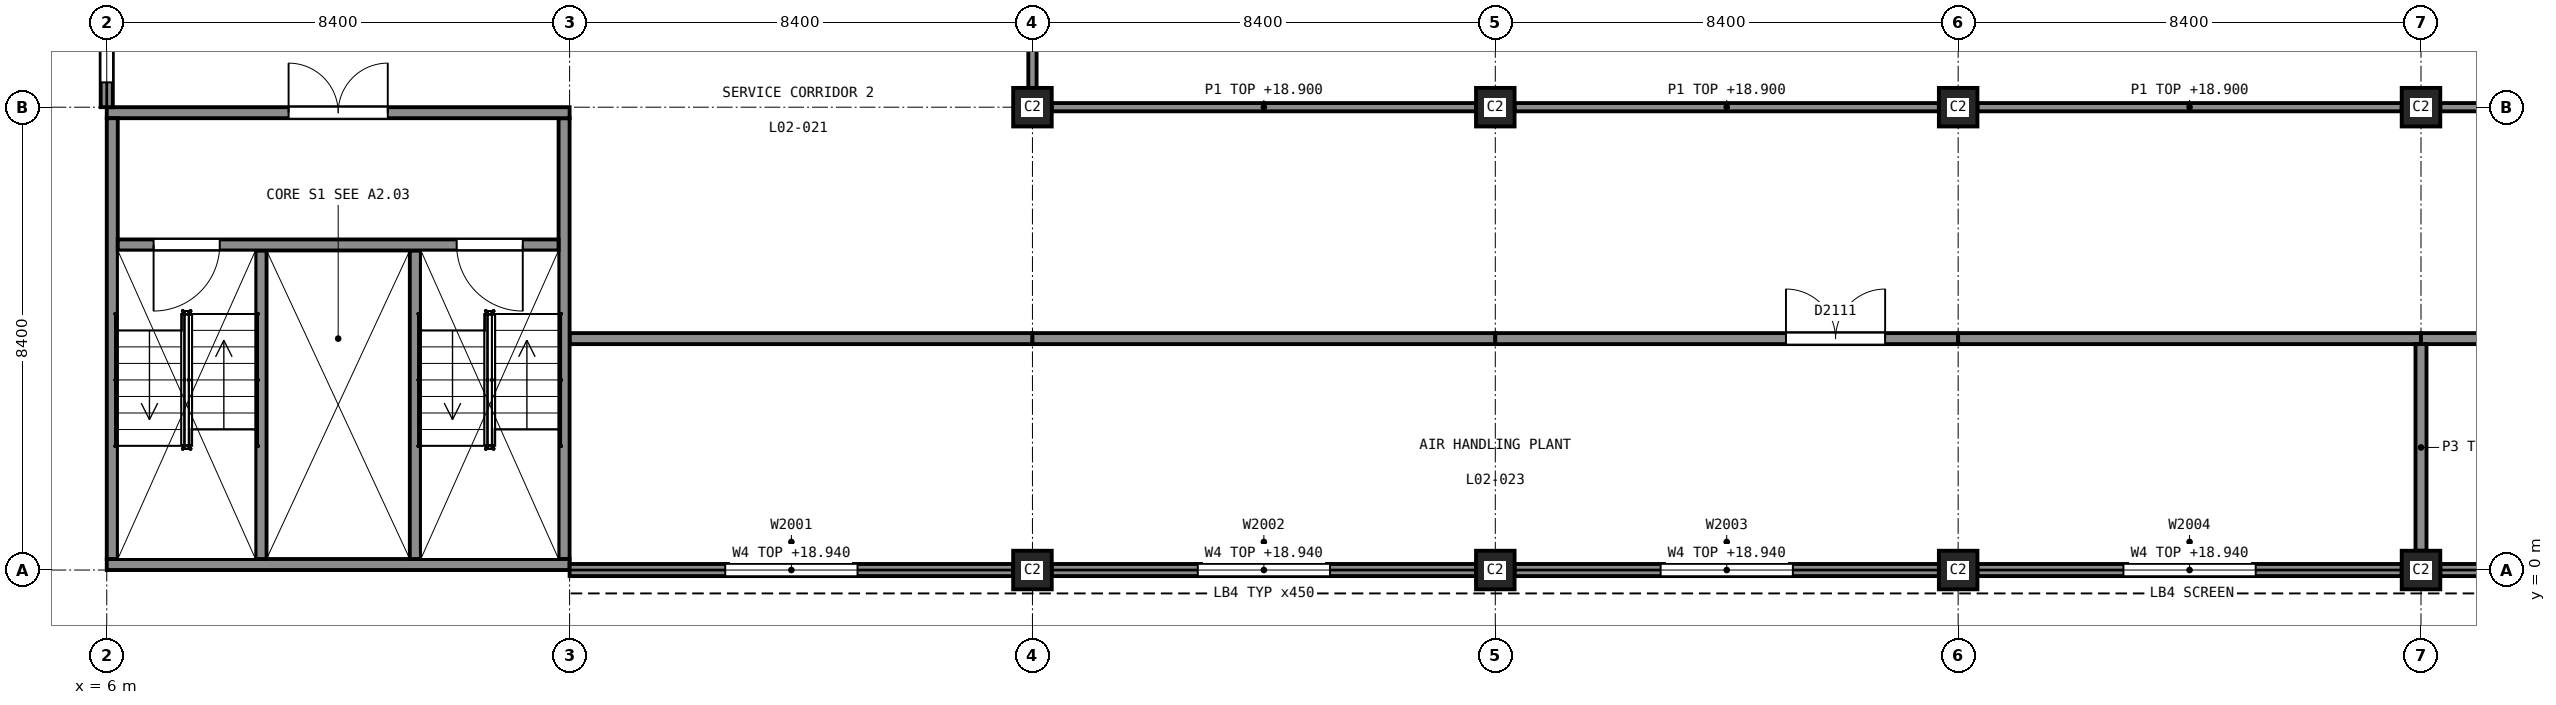
"""IFC4 building model, lengths in metres.
Left out: names, types, materials, properties, quantities, classifications, styles, units other than length and angle.
Written with IfcOpenShell. Run it as: python <this file> out.ifc"""

import sys

from ifc_helpers import new_model, si_unit, direction, frame, frame_2d, origin, origin_2d, place, context, subcontext, project, spatial, rectangle, extrude, element, fill, save


model = new_model("IFC4")
c1 = context("Model", 3, precision=1e-05, world=origin(), true_north=direction((0.0, 1.0)))
c2 = subcontext(c1, "Body", "Model", "MODEL_VIEW")
j1 = project(units=[si_unit("LENGTHUNIT", "METRE"), si_unit("PLANEANGLEUNIT", "RADIAN")], contexts=[c1])
p1 = place(None, origin())
s1 = spatial("IfcSite", under=j1, at=p1, CompositionType="ELEMENT")
p2 = place(p1, origin())
s2 = spatial("IfcBuilding", under=s1, at=p2, CompositionType="ELEMENT")
p3 = place(p2, frame((0.0, 0.0, 10.5)))
s3 = spatial("IfcBuildingStorey", under=s2, at=p3, CompositionType="ELEMENT", Elevation=10.5)
p4 = place(p3, frame((6.0, 0.1, 0.0), z_axis=(0.0, 0.0, 1.0), x_axis=(1.0, 0.0, 0.0)))
e1 = element("IfcWall", 1, at=p4, inside=s3, PredefinedType="SHEAR", context=c2, shape_type="SweptSolid", body=[
    extrude(rectangle(XDim=8.4, YDim=0.2, at=frame_2d((4.2, 0.0))), origin(), (0.0, 0.0, 1.0), 9.5),
])
p5 = place(p3, frame((6.0, 8.3, 0.0), z_axis=(0.0, 0.0, 1.0), x_axis=(1.0, 0.0, 0.0)))
e2 = element("IfcWall", 2, at=p5, inside=s3, PredefinedType="SHEAR", context=c2, shape_type="SweptSolid", body=[
    extrude(rectangle(XDim=8.4, YDim=0.2, at=frame_2d((4.2, 0.0))), origin(), (0.0, 0.0, 1.0), 9.5),
])
p6 = place(p5, frame((3.3, 0.0, 0.0)))
e3 = element("IfcOpeningElement", 3, at=p6, cuts=e2, PredefinedType="OPENING", context=c2, shape_type="SweptSolid", body=[
    extrude(rectangle(XDim=1.8, YDim=2.1, at=frame_2d((0.9, 1.05))), frame((0.0, 0.11, 0.0), z_axis=(0.0, -1.0, 0.0), x_axis=(1.0, 0.0, 0.0)), (0.0, 0.0, 1.0), 0.22),
])
for number, where, z_axis, x_axis in (
    (4, (6.1, 0.2, 0.0), (0.0, 0.0, 1.0), (0.0, 1.0, 0.0)),
    (5, (14.3, 0.2, 0.0), (0.0, 0.0, 1.0), (0.0, 1.0, 0.0)),
):
    element("IfcWall", number, at=place(p3, frame(where, z_axis=z_axis, x_axis=x_axis)), inside=s3, PredefinedType="SHEAR", context=c2, shape_type="SweptSolid", body=[
        extrude(rectangle(XDim=8.0, YDim=0.2, at=frame_2d((4.0, 0.0))), origin(), (0.0, 0.0, 1.0), 9.5),
    ])
p7 = place(p3, frame((6.2, 5.9, 0.0), z_axis=(0.0, 0.0, 1.0), x_axis=(1.0, 0.0, 0.0)))
e6 = element("IfcWall", 6, at=p7, inside=s3, PredefinedType="SHEAR", context=c2, shape_type="SweptSolid", body=[
    extrude(rectangle(XDim=8.0, YDim=0.2, at=frame_2d((4.0, 0.0))), origin(), (0.0, 0.0, 1.0), 9.5),
])
p8 = place(p7, frame((0.65, 0.0, 0.0)))
e7 = element("IfcOpeningElement", 7, at=p8, cuts=e6, PredefinedType="OPENING", context=c2, shape_type="SweptSolid", body=[
    extrude(rectangle(XDim=1.2, YDim=2.1, at=frame_2d((0.6, 1.05))), frame((0.0, 0.11, 0.0), z_axis=(0.0, -1.0, 0.0), x_axis=(1.0, 0.0, 0.0)), (0.0, 0.0, 1.0), 0.22),
])
p9 = place(p7, frame((6.15, 0.0, 0.0)))
e8 = element("IfcOpeningElement", 8, at=p9, cuts=e6, PredefinedType="OPENING", context=c2, shape_type="SweptSolid", body=[
    extrude(rectangle(XDim=1.2, YDim=2.1, at=frame_2d((0.6, 1.05))), frame((0.0, 0.11, 0.0), z_axis=(0.0, -1.0, 0.0), x_axis=(1.0, 0.0, 0.0)), (0.0, 0.0, 1.0), 0.22),
])
for number, where, z_axis, x_axis in (
    (9, (8.8, 0.2, 0.0), (0.0, 0.0, 1.0), (0.0, 1.0, 0.0)),
    (10, (11.6, 0.2, 0.0), (0.0, 0.0, 1.0), (0.0, 1.0, 0.0)),
):
    element("IfcWall", number, at=place(p3, frame(where, z_axis=z_axis, x_axis=x_axis)), inside=s3, PredefinedType="SHEAR", context=c2, shape_type="SweptSolid", body=[
        extrude(rectangle(XDim=5.6, YDim=0.2, at=frame_2d((2.8, 0.0))), origin(), (0.0, 0.0, 1.0), 9.5),
    ])
for number, where, z_axis, x_axis in (
    (11, (22.8, 0.0, 0.0), (0.0, 0.0, 1.0), (1.0, 0.0, 0.0)),
    (12, (22.8, 8.4, 0.0), (0.0, 0.0, 1.0), (1.0, 0.0, 0.0)),
    (13, (31.2, 0.0, 0.0), (0.0, 0.0, 1.0), (1.0, 0.0, 0.0)),
    (14, (31.2, 8.4, 0.0), (0.0, 0.0, 1.0), (1.0, 0.0, 0.0)),
    (15, (39.6, 0.0, 0.0), (0.0, 0.0, 1.0), (1.0, 0.0, 0.0)),
    (16, (39.6, 8.4, 0.0), (0.0, 0.0, 1.0), (1.0, 0.0, 0.0)),
    (17, (48.0, 0.0, 0.0), (0.0, 0.0, 1.0), (1.0, 0.0, 0.0)),
    (18, (48.0, 8.4, 0.0), (0.0, 0.0, 1.0), (1.0, 0.0, 0.0)),
):
    element("IfcColumn", number, at=place(p3, frame(where, z_axis=z_axis, x_axis=x_axis)), inside=s3, PredefinedType="COLUMN", context=c2, shape_type="SweptSolid", body=[
        extrude(rectangle(XDim=0.7, YDim=0.7, at=origin_2d()), origin(), (0.0, 0.0, 1.0), 9.5),
    ])
p10 = place(p3, frame((14.4, 0.0, 0.0), z_axis=(0.0, 0.0, 1.0), x_axis=(1.0, 0.0, 0.0)))
e19 = element("IfcWall", 19, at=p10, inside=s3, PredefinedType="SOLIDWALL", context=c2, shape_type="SweptSolid", body=[
    extrude(rectangle(XDim=8.05, YDim=0.22, at=frame_2d((4.025, 0.0))), origin(), (0.0, 0.0, 1.0), 8.44),
])
p11 = place(p10, frame((2.825, 0.0, 5.0)))
e20 = element("IfcOpeningElement", 20, at=p11, cuts=e19, PredefinedType="OPENING", context=c2, shape_type="SweptSolid", body=[
    extrude(rectangle(XDim=2.4, YDim=1.5, at=frame_2d((1.2, 0.75))), frame((0.0, 0.12, 0.0), z_axis=(0.0, -1.0, 0.0), x_axis=(1.0, 0.0, 0.0)), (0.0, 0.0, 1.0), 0.24),
])
p12 = place(p3, frame((23.15, 0.0, 0.0), z_axis=(0.0, 0.0, 1.0), x_axis=(1.0, 0.0, 0.0)))
e21 = element("IfcWall", 21, at=p12, inside=s3, PredefinedType="SOLIDWALL", context=c2, shape_type="SweptSolid", body=[
    extrude(rectangle(XDim=7.7, YDim=0.22, at=frame_2d((3.85, 0.0))), origin(), (0.0, 0.0, 1.0), 8.44),
])
p13 = place(p12, frame((2.65, 0.0, 5.0)))
e22 = element("IfcOpeningElement", 22, at=p13, cuts=e21, PredefinedType="OPENING", context=c2, shape_type="SweptSolid", body=[
    extrude(rectangle(XDim=2.4, YDim=1.5, at=frame_2d((1.2, 0.75))), frame((0.0, 0.12, 0.0), z_axis=(0.0, -1.0, 0.0), x_axis=(1.0, 0.0, 0.0)), (0.0, 0.0, 1.0), 0.24),
])
p14 = place(p3, frame((31.55, 0.0, 0.0), z_axis=(0.0, 0.0, 1.0), x_axis=(1.0, 0.0, 0.0)))
e23 = element("IfcWall", 23, at=p14, inside=s3, PredefinedType="SOLIDWALL", context=c2, shape_type="SweptSolid", body=[
    extrude(rectangle(XDim=7.7, YDim=0.22, at=frame_2d((3.85, 0.0))), origin(), (0.0, 0.0, 1.0), 8.44),
])
p15 = place(p14, frame((2.65, 0.0, 5.0)))
e24 = element("IfcOpeningElement", 24, at=p15, cuts=e23, PredefinedType="OPENING", context=c2, shape_type="SweptSolid", body=[
    extrude(rectangle(XDim=2.4, YDim=1.5, at=frame_2d((1.2, 0.75))), frame((0.0, 0.12, 0.0), z_axis=(0.0, -1.0, 0.0), x_axis=(1.0, 0.0, 0.0)), (0.0, 0.0, 1.0), 0.24),
])
p16 = place(p3, frame((39.95, 0.0, 0.0), z_axis=(0.0, 0.0, 1.0), x_axis=(1.0, 0.0, 0.0)))
e25 = element("IfcWall", 25, at=p16, inside=s3, PredefinedType="SOLIDWALL", context=c2, shape_type="SweptSolid", body=[
    extrude(rectangle(XDim=7.7, YDim=0.22, at=frame_2d((3.85, 0.0))), origin(), (0.0, 0.0, 1.0), 8.44),
])
p17 = place(p16, frame((2.65, 0.0, 5.0)))
e26 = element("IfcOpeningElement", 26, at=p17, cuts=e25, PredefinedType="OPENING", context=c2, shape_type="SweptSolid", body=[
    extrude(rectangle(XDim=2.4, YDim=1.5, at=frame_2d((1.2, 0.75))), frame((0.0, 0.12, 0.0), z_axis=(0.0, -1.0, 0.0), x_axis=(1.0, 0.0, 0.0)), (0.0, 0.0, 1.0), 0.24),
])
p18 = place(p3, frame((48.35, 0.0, 0.0), z_axis=(0.0, 0.0, 1.0), x_axis=(1.0, 0.0, 0.0)))
e27 = element("IfcWall", 27, at=p18, inside=s3, PredefinedType="SOLIDWALL", context=c2, shape_type="SweptSolid", body=[
    extrude(rectangle(XDim=7.7, YDim=0.22, at=frame_2d((3.85, 0.0))), origin(), (0.0, 0.0, 1.0), 8.44),
])
p19 = place(p18, frame((2.65, 0.0, 5.0)))
e28 = element("IfcOpeningElement", 28, at=p19, cuts=e27, PredefinedType="OPENING", context=c2, shape_type="SweptSolid", body=[
    extrude(rectangle(XDim=2.4, YDim=1.5, at=frame_2d((1.2, 0.75))), frame((0.0, 0.12, 0.0), z_axis=(0.0, -1.0, 0.0), x_axis=(1.0, 0.0, 0.0)), (0.0, 0.0, 1.0), 0.24),
])
p20 = place(p3, frame((6.0, 8.4, 0.0), z_axis=(0.0, 0.0, 1.0), x_axis=(0.0, 1.0, 0.0)))
e29 = element("IfcWall", 29, at=p20, inside=s3, PredefinedType="SOLIDWALL", context=c2, shape_type="SweptSolid", body=[
    extrude(rectangle(XDim=8.05, YDim=0.22, at=frame_2d((4.025, 0.0))), origin(), (0.0, 0.0, 1.0), 8.44),
])
p21 = place(p20, frame((0.45, 0.0, 0.9)))
e30 = element("IfcOpeningElement", 30, at=p21, cuts=e29, PredefinedType="OPENING", context=c2, shape_type="SweptSolid", body=[
    extrude(rectangle(XDim=3.6, YDim=1.5, at=frame_2d((1.8, 0.75))), frame((0.0, 0.12, 0.0), z_axis=(0.0, -1.0, 0.0), x_axis=(1.0, 0.0, 0.0)), (0.0, 0.0, 1.0), 0.24),
])
p22 = place(p3, frame((23.15, 8.4, 0.0), z_axis=(0.0, 0.0, 1.0), x_axis=(1.0, 0.0, 0.0)))
e31 = element("IfcWall", 31, at=p22, inside=s3, PredefinedType="PARTITIONING", context=c2, shape_type="SweptSolid", body=[
    extrude(rectangle(XDim=7.7, YDim=0.15, at=frame_2d((3.85, 0.0))), origin(), (0.0, 0.0, 1.0), 8.4),
])
for number, where, z_axis, x_axis in (
    (32, (31.55, 8.4, 0.0), (0.0, 0.0, 1.0), (1.0, 0.0, 0.0)),
    (33, (39.95, 8.4, 0.0), (0.0, 0.0, 1.0), (1.0, 0.0, 0.0)),
):
    element("IfcWall", number, at=place(p3, frame(where, z_axis=z_axis, x_axis=x_axis)), inside=s3, PredefinedType="PARTITIONING", context=c2, shape_type="SweptSolid", body=[
        extrude(rectangle(XDim=7.7, YDim=0.15, at=frame_2d((3.85, 0.0))), origin(), (0.0, 0.0, 1.0), 8.4),
    ])
p23 = place(p3, frame((48.35, 8.4, 0.0), z_axis=(0.0, 0.0, 1.0), x_axis=(1.0, 0.0, 0.0)))
e34 = element("IfcWall", 34, at=p23, inside=s3, PredefinedType="PARTITIONING", context=c2, shape_type="SweptSolid", body=[
    extrude(rectangle(XDim=8.05, YDim=0.15, at=frame_2d((4.025, 0.0))), origin(), (0.0, 0.0, 1.0), 8.4),
])
p24 = place(p23, frame((4.625, 0.0, 0.0)))
e35 = element("IfcOpeningElement", 35, at=p24, cuts=e34, PredefinedType="OPENING", context=c2, shape_type="SweptSolid", body=[
    extrude(rectangle(XDim=2.4, YDim=2.4, at=frame_2d((1.2, 1.2))), frame((0.0, 0.085, 0.0), z_axis=(0.0, -1.0, 0.0), x_axis=(1.0, 0.0, 0.0)), (0.0, 0.0, 1.0), 0.17),
])
p25 = place(p3, frame((22.8, 8.75, 0.0), z_axis=(0.0, 0.0, 1.0), x_axis=(0.0, 1.0, 0.0)))
e36 = element("IfcWall", 36, at=p25, inside=s3, PredefinedType="PARTITIONING", context=c2, shape_type="SweptSolid", body=[
    extrude(rectangle(XDim=3.75, YDim=0.15, at=frame_2d((1.875, 0.0))), origin(), (0.0, 0.0, 1.0), 8.4),
])
p26 = place(p3, frame((14.4, 4.2, 0.0), z_axis=(0.0, 0.0, 1.0), x_axis=(1.0, 0.0, 0.0)))
e37 = element("IfcWall", 37, at=p26, inside=s3, PredefinedType="PARTITIONING", context=c2, shape_type="SweptSolid", body=[
    extrude(rectangle(XDim=8.4, YDim=0.2, at=frame_2d((4.2, 0.0))), origin(), (0.0, 0.0, 1.0), 8.4),
])
p27 = place(p3, frame((22.8, 4.2, 0.0), z_axis=(0.0, 0.0, 1.0), x_axis=(1.0, 0.0, 0.0)))
e38 = element("IfcWall", 38, at=p27, inside=s3, PredefinedType="PARTITIONING", context=c2, shape_type="SweptSolid", body=[
    extrude(rectangle(XDim=8.4, YDim=0.2, at=frame_2d((4.2, 0.0))), origin(), (0.0, 0.0, 1.0), 8.4),
])
p28 = place(p3, frame((31.2, 4.2, 0.0), z_axis=(0.0, 0.0, 1.0), x_axis=(1.0, 0.0, 0.0)))
e39 = element("IfcWall", 39, at=p28, inside=s3, PredefinedType="PARTITIONING", context=c2, shape_type="SweptSolid", body=[
    extrude(rectangle(XDim=8.4, YDim=0.2, at=frame_2d((4.2, 0.0))), origin(), (0.0, 0.0, 1.0), 8.4),
])
p29 = place(p28, frame((5.275, 0.0, 0.0)))
e40 = element("IfcOpeningElement", 40, at=p29, cuts=e39, PredefinedType="OPENING", context=c2, shape_type="SweptSolid", body=[
    extrude(rectangle(XDim=1.8, YDim=2.1, at=frame_2d((0.9, 1.05))), frame((0.0, 0.11, 0.0), z_axis=(0.0, -1.0, 0.0), x_axis=(1.0, 0.0, 0.0)), (0.0, 0.0, 1.0), 0.22),
])
p30 = place(p3, frame((39.6, 4.2, 0.0), z_axis=(0.0, 0.0, 1.0), x_axis=(1.0, 0.0, 0.0)))
e41 = element("IfcWall", 41, at=p30, inside=s3, PredefinedType="PARTITIONING", context=c2, shape_type="SweptSolid", body=[
    extrude(rectangle(XDim=8.4, YDim=0.2, at=frame_2d((4.2, 0.0))), origin(), (0.0, 0.0, 1.0), 8.4),
])
p31 = place(p3, frame((48.0, 4.2, 0.0), z_axis=(0.0, 0.0, 1.0), x_axis=(1.0, 0.0, 0.0)))
e42 = element("IfcWall", 42, at=p31, inside=s3, PredefinedType="PARTITIONING", context=c2, shape_type="SweptSolid", body=[
    extrude(rectangle(XDim=8.4, YDim=0.2, at=frame_2d((4.2, 0.0))), origin(), (0.0, 0.0, 1.0), 8.4),
])
p32 = place(p31, frame((1.375, 0.0, 0.0)))
e43 = element("IfcOpeningElement", 43, at=p32, cuts=e42, PredefinedType="OPENING", context=c2, shape_type="SweptSolid", body=[
    extrude(rectangle(XDim=1.8, YDim=2.1, at=frame_2d((0.9, 1.05))), frame((0.0, 0.11, 0.0), z_axis=(0.0, -1.0, 0.0), x_axis=(1.0, 0.0, 0.0)), (0.0, 0.0, 1.0), 0.22),
])
p33 = place(p3, frame((48.0, 0.35, 0.0), z_axis=(0.0, 0.0, 1.0), x_axis=(0.0, 1.0, 0.0)))
e44 = element("IfcWall", 44, at=p33, inside=s3, PredefinedType="PARTITIONING", context=c2, shape_type="SweptSolid", body=[
    extrude(rectangle(XDim=3.75, YDim=0.2, at=frame_2d((1.875, 0.0))), origin(), (0.0, 0.0, 1.0), 8.4),
])
p34 = place(p11, origin())
e45 = element("IfcWindow", 45, at=p34, inside=s3, PartitioningType="SINGLE_PANEL", PredefinedType="WINDOW", context=c2, shape_type="SweptSolid", body=[
    extrude(rectangle(XDim=2.4, YDim=1.5, at=frame_2d((1.2, 0.75))), frame((0.0, 0.09, 0.0), z_axis=(0.0, -1.0, 0.0), x_axis=(1.0, 0.0, 0.0)), (0.0, 0.0, 1.0), 0.06),
])
fill(e20, e45)
p35 = place(p13, origin())
e46 = element("IfcWindow", 46, at=p35, inside=s3, PartitioningType="SINGLE_PANEL", PredefinedType="WINDOW", context=c2, shape_type="SweptSolid", body=[
    extrude(rectangle(XDim=2.4, YDim=1.5, at=frame_2d((1.2, 0.75))), frame((0.0, 0.09, 0.0), z_axis=(0.0, -1.0, 0.0), x_axis=(1.0, 0.0, 0.0)), (0.0, 0.0, 1.0), 0.06),
])
fill(e22, e46)
p36 = place(p15, origin())
e47 = element("IfcWindow", 47, at=p36, inside=s3, PartitioningType="SINGLE_PANEL", PredefinedType="WINDOW", context=c2, shape_type="SweptSolid", body=[
    extrude(rectangle(XDim=2.4, YDim=1.5, at=frame_2d((1.2, 0.75))), frame((0.0, 0.09, 0.0), z_axis=(0.0, -1.0, 0.0), x_axis=(1.0, 0.0, 0.0)), (0.0, 0.0, 1.0), 0.06),
])
fill(e24, e47)
p37 = place(p17, origin())
e48 = element("IfcWindow", 48, at=p37, inside=s3, PartitioningType="SINGLE_PANEL", PredefinedType="WINDOW", context=c2, shape_type="SweptSolid", body=[
    extrude(rectangle(XDim=2.4, YDim=1.5, at=frame_2d((1.2, 0.75))), frame((0.0, 0.09, 0.0), z_axis=(0.0, -1.0, 0.0), x_axis=(1.0, 0.0, 0.0)), (0.0, 0.0, 1.0), 0.06),
])
fill(e26, e48)
p38 = place(p21, origin())
e49 = element("IfcWindow", 49, at=p38, inside=s3, PartitioningType="DOUBLE_PANEL_VERTICAL", PredefinedType="WINDOW", context=c2, shape_type="SweptSolid", body=[
    extrude(rectangle(XDim=3.6, YDim=1.5, at=frame_2d((1.8, 0.75))), frame((0.0, -0.03, 0.0), z_axis=(0.0, -1.0, 0.0), x_axis=(1.0, 0.0, 0.0)), (0.0, 0.0, 1.0), 0.06),
])
fill(e30, e49)
p39 = place(p29, origin())
e50 = element("IfcDoor", 50, at=p39, inside=s3, OperationType="DOUBLE_DOOR_SINGLE_SWING", PredefinedType="DOOR", context=c2, shape_type="SweptSolid", body=[
    extrude(rectangle(XDim=1.8, YDim=2.1, at=frame_2d((0.9, 1.05))), frame((0.0, 0.025, 0.0), z_axis=(0.0, -1.0, 0.0), x_axis=(1.0, 0.0, 0.0)), (0.0, 0.0, 1.0), 0.05),
])
fill(e40, e50)
p40 = place(p6, origin())
e51 = element("IfcDoor", 51, at=p40, inside=s3, OperationType="DOUBLE_DOOR_SINGLE_SWING", PredefinedType="DOOR", context=c2, shape_type="SweptSolid", body=[
    extrude(rectangle(XDim=1.8, YDim=2.1, at=frame_2d((0.9, 1.05))), frame((0.0, 0.025, 0.0), z_axis=(0.0, -1.0, 0.0), x_axis=(1.0, 0.0, 0.0)), (0.0, 0.0, 1.0), 0.05),
])
fill(e3, e51)
p41 = place(p8, origin())
e52 = element("IfcDoor", 52, at=p41, inside=s3, OperationType="SINGLE_SWING_LEFT", PredefinedType="DOOR", context=c2, shape_type="SweptSolid", body=[
    extrude(rectangle(XDim=1.2, YDim=2.1, at=frame_2d((0.6, 1.05))), frame((0.0, 0.025, 0.0), z_axis=(0.0, -1.0, 0.0), x_axis=(1.0, 0.0, 0.0)), (0.0, 0.0, 1.0), 0.05),
])
fill(e7, e52)
p42 = place(p9, origin())
e53 = element("IfcDoor", 53, at=p42, inside=s3, OperationType="SINGLE_SWING_RIGHT", PredefinedType="DOOR", context=c2, shape_type="SweptSolid", body=[
    extrude(rectangle(XDim=1.2, YDim=2.1, at=frame_2d((0.6, 1.05))), frame((0.0, 0.025, 0.0), z_axis=(0.0, -1.0, 0.0), x_axis=(1.0, 0.0, 0.0)), (0.0, 0.0, 1.0), 0.05),
])
fill(e8, e53)
save(model, sys.argv[1])
